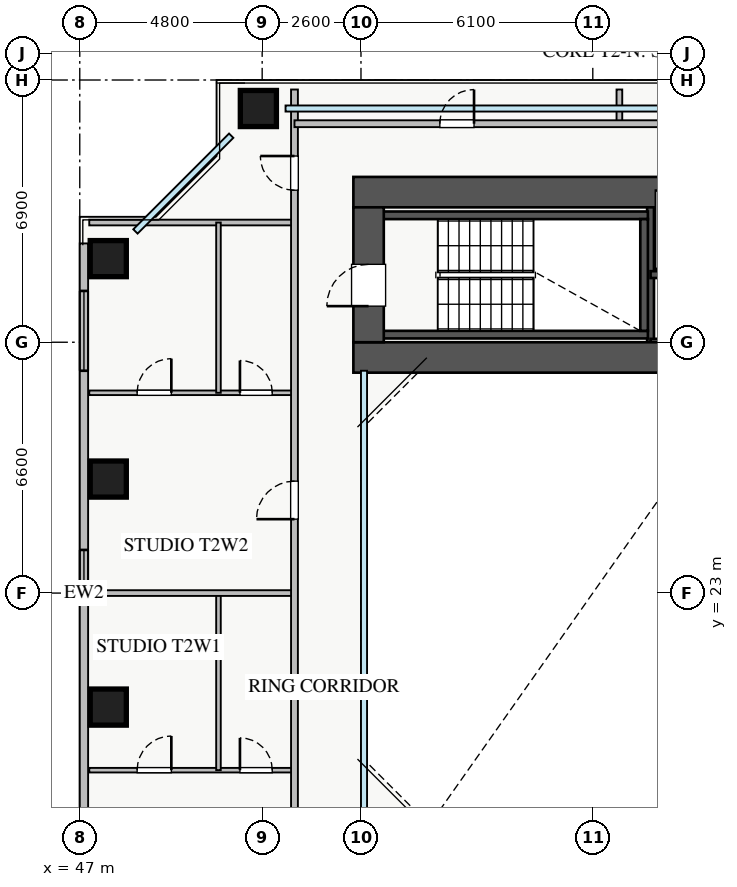
"""IFC4 building model, lengths in metres.
Left out: names, types, materials, properties, quantities, classifications, styles, units other than length and angle.
Written with IfcOpenShell. Run it as: python <this file> out.ifc"""

import sys

from ifc_helpers import new_model, si_unit, direction, frame, frame_2d, origin, origin_2d, place, context, subcontext, project, spatial, rectangle, extrude, source, transform, mapped, element, fill, save


model = new_model("IFC4")
c1 = context("Model", 3, precision=1e-05, world=origin(), true_north=direction((0.0, 1.0)))
c2 = subcontext(c1, "Body", "Model", "MODEL_VIEW")
j1 = project(units=[si_unit("LENGTHUNIT", "METRE"), si_unit("PLANEANGLEUNIT", "RADIAN")], contexts=[c1])
p1 = place(None, origin())
s1 = spatial("IfcSite", under=j1, at=p1, CompositionType="ELEMENT")
p2 = place(p1, origin())
s2 = spatial("IfcBuilding", under=s1, at=p2, CompositionType="ELEMENT")
p3 = place(p2, frame((0.0, 0.0, 32.75)))
s3 = spatial("IfcBuildingStorey", under=s2, at=p3, CompositionType="ELEMENT", Elevation=32.75)
p4 = place(p3, frame((62.02, 29.6, 0.0), z_axis=(0.0, 0.0, 1.0), x_axis=(0.0, 1.0, 0.0)))
e1 = element("IfcWall", 1, at=p4, inside=s3, PredefinedType="SHEAR", context=c2, shape_type="SweptSolid", body=[
    extrude(rectangle(XDim=3.95, YDim=0.18, at=frame_2d((1.975, 0.0))), origin(), (0.0, 0.0, 1.0), 3.07),
])
for number, where, z_axis, x_axis in (
    (2, (62.02, 31.38, 0.0), (0.0, 0.0, 1.0), (1.0, 0.0, 0.0)),
    (3, (62.02, 29.6, 0.0), (0.0, 0.0, 1.0), (1.0, 0.0, 0.0)),
):
    element("IfcWall", number, at=place(p3, frame(where, z_axis=z_axis, x_axis=x_axis)), inside=s3, PredefinedType="SHEAR", context=c2, shape_type="SweptSolid", body=[
        extrude(rectangle(XDim=1.86, YDim=0.18, at=frame_2d((0.93, 0.0))), origin(), (0.0, 0.0, 1.0), 3.07),
    ])
for number, where, z_axis, x_axis in (
    (4, (54.8, 29.8, 0.0), (0.0, 0.0, 1.0), (1.0, 0.0, 0.0)),
    (5, (54.8, 32.94, 0.0), (0.0, 0.0, 1.0), (1.0, 0.0, 0.0)),
):
    element("IfcWall", number, at=place(p3, frame(where, z_axis=z_axis, x_axis=x_axis)), inside=s3, PredefinedType="SHEAR", context=c2, shape_type="SweptSolid", body=[
        extrude(rectangle(XDim=7.15, YDim=0.2, at=frame_2d((3.575, 0.0))), origin(), (0.0, 0.0, 1.0), 3.25),
    ])
p5 = place(p3, frame((61.85, 29.9, 0.0), z_axis=(0.0, 0.0, 1.0), x_axis=(0.0, 1.0, 0.0)))
e6 = element("IfcWall", 6, at=p5, inside=s3, PredefinedType="SHEAR", context=c2, shape_type="SweptSolid", body=[
    extrude(rectangle(XDim=2.94, YDim=0.2, at=frame_2d((1.47, 0.0))), origin(), (0.0, 0.0, 1.0), 3.25),
])
p6 = place(p3, frame((54.2, 29.2, 0.0), z_axis=(0.0, 0.0, 1.0), x_axis=(1.0, 0.0, 0.0)))
e7 = element("IfcWall", 7, at=p6, inside=s3, PredefinedType="SHEAR", context=c2, shape_type="SweptSolid", body=[
    extrude(rectangle(XDim=12.6, YDim=0.8, at=frame_2d((6.3, 0.0))), origin(), (0.0, 0.0, 1.0), 3.25),
])
p7 = place(p3, frame((54.2, 33.55, 0.0), z_axis=(0.0, 0.0, 1.0), x_axis=(1.0, 0.0, 0.0)))
e8 = element("IfcWall", 8, at=p7, inside=s3, PredefinedType="SHEAR", context=c2, shape_type="SweptSolid", body=[
    extrude(rectangle(XDim=12.6, YDim=0.8, at=frame_2d((6.3, 0.0))), origin(), (0.0, 0.0, 1.0), 3.25),
])
p8 = place(p7, frame((8.2, 0.0, 0.0)))
e9 = element("IfcOpeningElement", 9, at=p8, cuts=e8, PredefinedType="OPENING", context=c2, shape_type="SweptSolid", body=[
    extrude(rectangle(XDim=1.1, YDim=2.05, at=frame_2d((0.55, 1.025))), frame((0.0, 0.41, 0.0), z_axis=(0.0, -1.0, 0.0), x_axis=(1.0, 0.0, 0.0)), (0.0, 0.0, 1.0), 0.82),
])
p9 = place(p3, frame((54.6, 29.6, 0.0), z_axis=(0.0, 0.0, 1.0), x_axis=(0.0, 1.0, 0.0)))
e10 = element("IfcWall", 10, at=p9, inside=s3, PredefinedType="SHEAR", context=c2, shape_type="SweptSolid", body=[
    extrude(rectangle(XDim=3.55, YDim=0.8, at=frame_2d((1.775, 0.0))), origin(), (0.0, 0.0, 1.0), 3.25),
])
p10 = place(p9, frame((0.95, 0.0, 0.0)))
e11 = element("IfcOpeningElement", 11, at=p10, cuts=e10, PredefinedType="OPENING", context=c2, shape_type="SweptSolid", body=[
    extrude(rectangle(XDim=1.1, YDim=2.05, at=frame_2d((0.55, 1.025))), frame((0.0, 0.41, 0.0), z_axis=(0.0, -1.0, 0.0), x_axis=(1.0, 0.0, 0.0)), (0.0, 0.0, 1.0), 0.82),
])
m1 = source(origin(), c2, "Body", "SweptSolid", [
    extrude(rectangle(XDim=0.95, YDim=0.95, at=origin_2d()), origin(), (0.0, 0.0, 1.0), 3.25),
])
for number, where, z_axis, x_axis in (
    (12, (51.7, 35.75, 0.0), (0.0, 0.0, 1.0), (1.0, 0.0, 0.0)),
    (13, (47.75, 20.0, 0.0), (0.0, 0.0, 1.0), (1.0, 0.0, 0.0)),
    (14, (47.75, 26.0, 0.0), (0.0, 0.0, 1.0), (1.0, 0.0, 0.0)),
    (15, (47.75, 31.8, 0.0), (0.0, 0.0, 1.0), (1.0, 0.0, 0.0)),
):
    element("IfcColumn", number, at=place(p3, frame(where, z_axis=z_axis, x_axis=x_axis)), inside=s3, PredefinedType="COLUMN", context=c2, shape_type="MappedRepresentation", body=[
        mapped(m1, transform((0.0, 0.0, 0.0), x_axis=(1.0, 0.0, 0.0), y_axis=(0.0, 1.0, 0.0), z_axis=(0.0, 0.0, 1.0), scale=1.0)),
    ])
p11 = place(p3, frame((47.11, 13.8, 0.0), z_axis=(0.0, 0.0, 1.0), x_axis=(0.0, 1.0, 0.0)))
e16 = element("IfcWall", 16, at=p11, inside=s3, PredefinedType="STANDARD", context=c2, shape_type="SweptSolid", body=[
    extrude(rectangle(XDim=18.4, YDim=0.22, at=frame_2d((9.2, 0.0))), origin(), (0.0, 0.0, 1.0), 2.61),
])
p12 = place(p11, frame((1.1, 0.0, 0.9)))
e17 = element("IfcOpeningElement", 17, at=p12, cuts=e16, PredefinedType="OPENING", context=c2, shape_type="SweptSolid", body=[
    extrude(rectangle(XDim=2.4, YDim=1.48, at=frame_2d((1.2, 0.74))), frame((0.0, 0.12, 0.0), z_axis=(0.0, -1.0, 0.0), x_axis=(1.0, 0.0, 0.0)), (0.0, 0.0, 1.0), 0.24),
])
p13 = place(p11, frame((15.05, 0.0, 0.9)))
e18 = element("IfcOpeningElement", 18, at=p13, cuts=e16, PredefinedType="OPENING", context=c2, shape_type="SweptSolid", body=[
    extrude(rectangle(XDim=2.1, YDim=1.48, at=frame_2d((1.05, 0.74))), frame((0.0, 0.12, 0.0), z_axis=(0.0, -1.0, 0.0), x_axis=(1.0, 0.0, 0.0)), (0.0, 0.0, 1.0), 0.24),
])
p14 = place(p11, frame((9.435, 0.0, 0.9)))
e19 = element("IfcOpeningElement", 19, at=p14, cuts=e16, PredefinedType="OPENING", context=c2, shape_type="SweptSolid", body=[
    extrude(rectangle(XDim=0.9, YDim=1.2, at=frame_2d((0.45, 0.6))), frame((0.0, 0.12, 0.0), z_axis=(0.0, -1.0, 0.0), x_axis=(1.0, 0.0, 0.0)), (0.0, 0.0, 1.0), 0.24),
])
p15 = place(p3, frame((47.25, 32.75, 0.0), z_axis=(0.0, 0.0, 1.0), x_axis=(1.0, 0.0, 0.0)))
e20 = element("IfcWall", 20, at=p15, inside=s3, PredefinedType="PARTITIONING", context=c2, shape_type="SweptSolid", body=[
    extrude(rectangle(XDim=5.4, YDim=0.15, at=frame_2d((2.7, 0.0))), origin(), (0.0, 0.0, 1.0), 3.07),
])
p16 = place(p3, frame((47.25, 18.34, 0.0), z_axis=(0.0, 0.0, 1.0), x_axis=(1.0, 0.0, 0.0)))
e21 = element("IfcWall", 21, at=p16, inside=s3, PredefinedType="PLUMBINGWALL", context=c2, shape_type="SweptSolid", body=[
    extrude(rectangle(XDim=5.4, YDim=0.12, at=frame_2d((2.7, 0.0))), origin(), (0.0, 0.0, 1.0), 2.865),
])
p17 = place(p16, frame((1.26, 0.0, 0.0)))
e22 = element("IfcOpeningElement", 22, at=p17, cuts=e21, PredefinedType="OPENING", context=c2, shape_type="SweptSolid", body=[
    extrude(rectangle(XDim=0.9, YDim=2.05, at=frame_2d((0.45, 1.025))), frame((0.0, 0.07, 0.0), z_axis=(0.0, -1.0, 0.0), x_axis=(1.0, 0.0, 0.0)), (0.0, 0.0, 1.0), 0.14),
])
p18 = place(p16, frame((3.965, 0.0, 0.0)))
e23 = element("IfcOpeningElement", 23, at=p18, cuts=e21, PredefinedType="OPENING", context=c2, shape_type="SweptSolid", body=[
    extrude(rectangle(XDim=0.85, YDim=2.05, at=frame_2d((0.425, 1.025))), frame((0.0, 0.07, 0.0), z_axis=(0.0, -1.0, 0.0), x_axis=(1.0, 0.0, 0.0)), (0.0, 0.0, 1.0), 0.14),
])
p19 = place(p3, frame((50.65, 18.34, 0.0), z_axis=(0.0, 0.0, 1.0), x_axis=(0.0, 1.0, 0.0)))
e24 = element("IfcWall", 24, at=p19, inside=s3, PredefinedType="PLUMBINGWALL", context=c2, shape_type="SweptSolid", body=[
    extrude(rectangle(XDim=4.66, YDim=0.12, at=frame_2d((2.33, 0.0))), origin(), (0.0, 0.0, 1.0), 3.07),
])
p20 = place(p3, frame((47.25, 28.27, 0.0), z_axis=(0.0, 0.0, 1.0), x_axis=(1.0, 0.0, 0.0)))
e25 = element("IfcWall", 25, at=p20, inside=s3, PredefinedType="PLUMBINGWALL", context=c2, shape_type="SweptSolid", body=[
    extrude(rectangle(XDim=5.4, YDim=0.12, at=frame_2d((2.7, 0.0))), origin(), (0.0, 0.0, 1.0), 3.07),
])
p21 = place(p20, frame((1.26, 0.0, 0.0)))
e26 = element("IfcOpeningElement", 26, at=p21, cuts=e25, PredefinedType="OPENING", context=c2, shape_type="SweptSolid", body=[
    extrude(rectangle(XDim=0.9, YDim=2.05, at=frame_2d((0.45, 1.025))), frame((0.0, 0.07, 0.0), z_axis=(0.0, -1.0, 0.0), x_axis=(1.0, 0.0, 0.0)), (0.0, 0.0, 1.0), 0.14),
])
p22 = place(p20, frame((3.965, 0.0, 0.0)))
e27 = element("IfcOpeningElement", 27, at=p22, cuts=e25, PredefinedType="OPENING", context=c2, shape_type="SweptSolid", body=[
    extrude(rectangle(XDim=0.85, YDim=2.05, at=frame_2d((0.425, 1.025))), frame((0.0, 0.07, 0.0), z_axis=(0.0, -1.0, 0.0), x_axis=(1.0, 0.0, 0.0)), (0.0, 0.0, 1.0), 0.14),
])
p23 = place(p3, frame((50.65, 28.27, 0.0), z_axis=(0.0, 0.0, 1.0), x_axis=(0.0, 1.0, 0.0)))
e28 = element("IfcWall", 28, at=p23, inside=s3, PredefinedType="PLUMBINGWALL", context=c2, shape_type="SweptSolid", body=[
    extrude(rectangle(XDim=4.48, YDim=0.12, at=frame_2d((2.24, 0.0))), origin(), (0.0, 0.0, 1.0), 3.07),
])
p24 = place(p3, frame((47.25, 23.0, 0.0), z_axis=(0.0, 0.0, 1.0), x_axis=(1.0, 0.0, 0.0)))
e29 = element("IfcWall", 29, at=p24, inside=s3, PredefinedType="PARTITIONING", context=c2, shape_type="SweptSolid", body=[
    extrude(rectangle(XDim=5.4, YDim=0.15, at=frame_2d((2.7, 0.0))), origin(), (0.0, 0.0, 1.0), 2.865),
])
p25 = place(p3, frame((52.65, 9.75, 0.0), z_axis=(0.0, 0.0, 1.0), x_axis=(0.0, 1.0, 0.0)))
e30 = element("IfcWall", 30, at=p25, inside=s3, PredefinedType="PARTITIONING", context=c2, shape_type="SweptSolid", body=[
    extrude(rectangle(XDim=26.5, YDim=0.18, at=frame_2d((13.25, 0.0))), origin(), (0.0, 0.0, 1.0), 3.07),
])
p26 = place(p25, frame((23.85, 0.0, 0.0)))
e31 = element("IfcOpeningElement", 31, at=p26, cuts=e30, PredefinedType="OPENING", context=c2, shape_type="SweptSolid", body=[
    extrude(rectangle(XDim=0.9, YDim=2.05, at=frame_2d((0.45, 1.025))), frame((0.0, 0.1, 0.0), z_axis=(0.0, -1.0, 0.0), x_axis=(1.0, 0.0, 0.0)), (0.0, 0.0, 1.0), 0.2),
])
p27 = place(p25, frame((1.75, 0.0, 0.0)))
e32 = element("IfcOpeningElement", 32, at=p27, cuts=e30, PredefinedType="OPENING", context=c2, shape_type="SweptSolid", body=[
    extrude(rectangle(XDim=0.9, YDim=2.05, at=frame_2d((0.45, 1.025))), frame((0.0, 0.1, 0.0), z_axis=(0.0, -1.0, 0.0), x_axis=(1.0, 0.0, 0.0)), (0.0, 0.0, 1.0), 0.2),
])
p28 = place(p25, frame((5.355, 0.0, 0.0)))
e33 = element("IfcOpeningElement", 33, at=p28, cuts=e30, PredefinedType="OPENING", context=c2, shape_type="SweptSolid", body=[
    extrude(rectangle(XDim=1.0, YDim=2.05, at=frame_2d((0.5, 1.025))), frame((0.0, 0.1, 0.0), z_axis=(0.0, -1.0, 0.0), x_axis=(1.0, 0.0, 0.0)), (0.0, 0.0, 1.0), 0.2),
])
p29 = place(p25, frame((15.195, 0.0, 0.0)))
e34 = element("IfcOpeningElement", 34, at=p29, cuts=e30, PredefinedType="OPENING", context=c2, shape_type="SweptSolid", body=[
    extrude(rectangle(XDim=1.0, YDim=2.05, at=frame_2d((0.5, 1.025))), frame((0.0, 0.1, 0.0), z_axis=(0.0, -1.0, 0.0), x_axis=(1.0, 0.0, 0.0)), (0.0, 0.0, 1.0), 0.2),
])
p30 = place(p3, frame((61.2, 35.35, 0.0), z_axis=(0.0, 0.0, 1.0), x_axis=(0.0, 1.0, 0.0)))
e35 = element("IfcWall", 35, at=p30, inside=s3, PredefinedType="PARTITIONING", context=c2, shape_type="SweptSolid", body=[
    extrude(rectangle(XDim=0.9, YDim=0.15, at=frame_2d((0.45, 0.0))), origin(), (0.0, 0.0, 1.0), 3.07),
])
p31 = place(p3, frame((52.65, 35.35, 0.0), z_axis=(0.0, 0.0, 1.0), x_axis=(1.0, 0.0, 0.0)))
e36 = element("IfcWall", 36, at=p31, inside=s3, PredefinedType="PARTITIONING", context=c2, shape_type="SweptSolid", body=[
    extrude(rectangle(XDim=17.0, YDim=0.18, at=frame_2d((8.5, 0.0))), origin(), (0.0, 0.0, 1.0), 3.07),
])
p32 = place(p31, frame((3.825, 0.0, 0.0)))
e37 = element("IfcOpeningElement", 37, at=p32, cuts=e36, PredefinedType="OPENING", context=c2, shape_type="SweptSolid", body=[
    extrude(rectangle(XDim=0.9, YDim=2.05, at=frame_2d((0.45, 1.025))), frame((0.0, 0.1, 0.0), z_axis=(0.0, -1.0, 0.0), x_axis=(1.0, 0.0, 0.0)), (0.0, 0.0, 1.0), 0.2),
])
p33 = place(p31, frame((12.325, 0.0, 0.0)))
e38 = element("IfcOpeningElement", 38, at=p33, cuts=e36, PredefinedType="OPENING", context=c2, shape_type="SweptSolid", body=[
    extrude(rectangle(XDim=0.9, YDim=2.05, at=frame_2d((0.45, 1.025))), frame((0.0, 0.1, 0.0), z_axis=(0.0, -1.0, 0.0), x_axis=(1.0, 0.0, 0.0)), (0.0, 0.0, 1.0), 0.2),
])
m2 = source(origin(), c2, "Body", "SweptSolid", [
    extrude(rectangle(XDim=2.1, YDim=1.48, at=frame_2d((1.05, 0.74))), frame((0.0, 0.03, 0.0), z_axis=(0.0, -1.0, 0.0), x_axis=(1.0, 0.0, 0.0)), (0.0, 0.0, 1.0), 0.06),
])
p34 = place(p13, origin())
e39 = element("IfcWindow", 39, at=p34, inside=s3, PartitioningType="TRIPLE_PANEL_VERTICAL", PredefinedType="WINDOW", context=c2, shape_type="MappedRepresentation", body=[
    mapped(m2, transform((0.0, 0.0, 0.0), x_axis=(1.0, 0.0, 0.0), y_axis=(0.0, 1.0, 0.0), z_axis=(0.0, 0.0, 1.0), scale=1.0)),
])
fill(e18, e39)
m3 = source(origin(), c2, "Body", "SweptSolid", [
    extrude(rectangle(XDim=1.1, YDim=2.05, at=frame_2d((0.55, 1.025))), frame((0.0, 0.025, 0.0), z_axis=(0.0, -1.0, 0.0), x_axis=(1.0, 0.0, 0.0)), (0.0, 0.0, 1.0), 0.05),
])
p35 = place(p10, origin())
e40 = element("IfcDoor", 40, at=p35, inside=s3, OperationType="SINGLE_SWING_LEFT", PredefinedType="DOOR", context=c2, shape_type="MappedRepresentation", body=[
    mapped(m3, transform((0.0, 0.0, 0.0), x_axis=(1.0, 0.0, 0.0), y_axis=(0.0, 1.0, 0.0), z_axis=(0.0, 0.0, 1.0), scale=1.0)),
])
fill(e11, e40)
m4 = source(origin(), c2, "Body", "SweptSolid", [
    extrude(rectangle(XDim=0.9, YDim=2.05, at=frame_2d((0.45, 1.025))), frame((0.0, 0.025, 0.0), z_axis=(0.0, -1.0, 0.0), x_axis=(1.0, 0.0, 0.0)), (0.0, 0.0, 1.0), 0.05),
])
p36 = place(p17, origin())
e41 = element("IfcDoor", 41, at=p36, inside=s3, OperationType="SINGLE_SWING_RIGHT", PredefinedType="DOOR", context=c2, shape_type="MappedRepresentation", body=[
    mapped(m4, transform((0.0, 0.0, 0.0), x_axis=(1.0, 0.0, 0.0), y_axis=(0.0, 1.0, 0.0), z_axis=(0.0, 0.0, 1.0), scale=1.0)),
])
fill(e22, e41)
m5 = source(origin(), c2, "Body", "SweptSolid", [
    extrude(rectangle(XDim=0.85, YDim=2.05, at=frame_2d((0.425, 1.025))), frame((0.0, 0.025, 0.0), z_axis=(0.0, -1.0, 0.0), x_axis=(1.0, 0.0, 0.0)), (0.0, 0.0, 1.0), 0.05),
])
p37 = place(p18, origin())
e42 = element("IfcDoor", 42, at=p37, inside=s3, OperationType="SINGLE_SWING_LEFT", PredefinedType="DOOR", context=c2, shape_type="MappedRepresentation", body=[
    mapped(m5, transform((0.0, 0.0, 0.0), x_axis=(1.0, 0.0, 0.0), y_axis=(0.0, 1.0, 0.0), z_axis=(0.0, 0.0, 1.0), scale=1.0)),
])
fill(e23, e42)
p38 = place(p21, origin())
e43 = element("IfcDoor", 43, at=p38, inside=s3, OperationType="SINGLE_SWING_RIGHT", PredefinedType="DOOR", context=c2, shape_type="MappedRepresentation", body=[
    mapped(m4, transform((0.0, 0.0, 0.0), x_axis=(1.0, 0.0, 0.0), y_axis=(0.0, 1.0, 0.0), z_axis=(0.0, 0.0, 1.0), scale=1.0)),
])
fill(e26, e43)
p39 = place(p22, origin())
e44 = element("IfcDoor", 44, at=p39, inside=s3, OperationType="SINGLE_SWING_LEFT", PredefinedType="DOOR", context=c2, shape_type="MappedRepresentation", body=[
    mapped(m5, transform((0.0, 0.0, 0.0), x_axis=(1.0, 0.0, 0.0), y_axis=(0.0, 1.0, 0.0), z_axis=(0.0, 0.0, 1.0), scale=1.0)),
])
fill(e27, e44)
p40 = place(p26, origin())
e45 = element("IfcDoor", 45, at=p40, inside=s3, OperationType="SINGLE_SWING_RIGHT", PredefinedType="DOOR", context=c2, shape_type="MappedRepresentation", body=[
    mapped(m4, transform((0.0, 0.0, 0.0), x_axis=(1.0, 0.0, 0.0), y_axis=(0.0, 1.0, 0.0), z_axis=(0.0, 0.0, 1.0), scale=1.0)),
])
fill(e31, e45)
m6 = source(origin(), c2, "Body", "SweptSolid", [
    extrude(rectangle(XDim=1.0, YDim=2.05, at=frame_2d((0.5, 1.025))), frame((0.0, 0.025, 0.0), z_axis=(0.0, -1.0, 0.0), x_axis=(1.0, 0.0, 0.0)), (0.0, 0.0, 1.0), 0.05),
])
p41 = place(p29, origin())
e46 = element("IfcDoor", 46, at=p41, inside=s3, OperationType="SINGLE_SWING_LEFT", PredefinedType="DOOR", context=c2, shape_type="MappedRepresentation", body=[
    mapped(m6, transform((0.0, 0.0, 0.0), x_axis=(1.0, 0.0, 0.0), y_axis=(0.0, 1.0, 0.0), z_axis=(0.0, 0.0, 1.0), scale=1.0)),
])
fill(e34, e46)
p42 = place(p32, origin())
e47 = element("IfcDoor", 47, at=p42, inside=s3, OperationType="SINGLE_SWING_RIGHT", PredefinedType="DOOR", context=c2, shape_type="MappedRepresentation", body=[
    mapped(m4, transform((0.0, 0.0, 0.0), x_axis=(1.0, 0.0, 0.0), y_axis=(0.0, 1.0, 0.0), z_axis=(0.0, 0.0, 1.0), scale=1.0)),
])
fill(e37, e47)
m7 = source(origin(), c2, "Body", "SweptSolid", [
    extrude(rectangle(XDim=0.9, YDim=1.2, at=frame_2d((0.45, 0.6))), frame((0.0, 0.03, 0.0), z_axis=(0.0, -1.0, 0.0), x_axis=(1.0, 0.0, 0.0)), (0.0, 0.0, 1.0), 0.06),
])
p43 = place(p14, origin())
e48 = element("IfcWindow", 48, at=p43, inside=s3, PartitioningType="SINGLE_PANEL", PredefinedType="WINDOW", context=c2, shape_type="MappedRepresentation", body=[
    mapped(m7, transform((0.0, 0.0, 0.0), x_axis=(1.0, 0.0, 0.0), y_axis=(0.0, 1.0, 0.0), z_axis=(0.0, 0.0, 1.0), scale=1.0)),
])
fill(e19, e48)
save(model, sys.argv[1])
